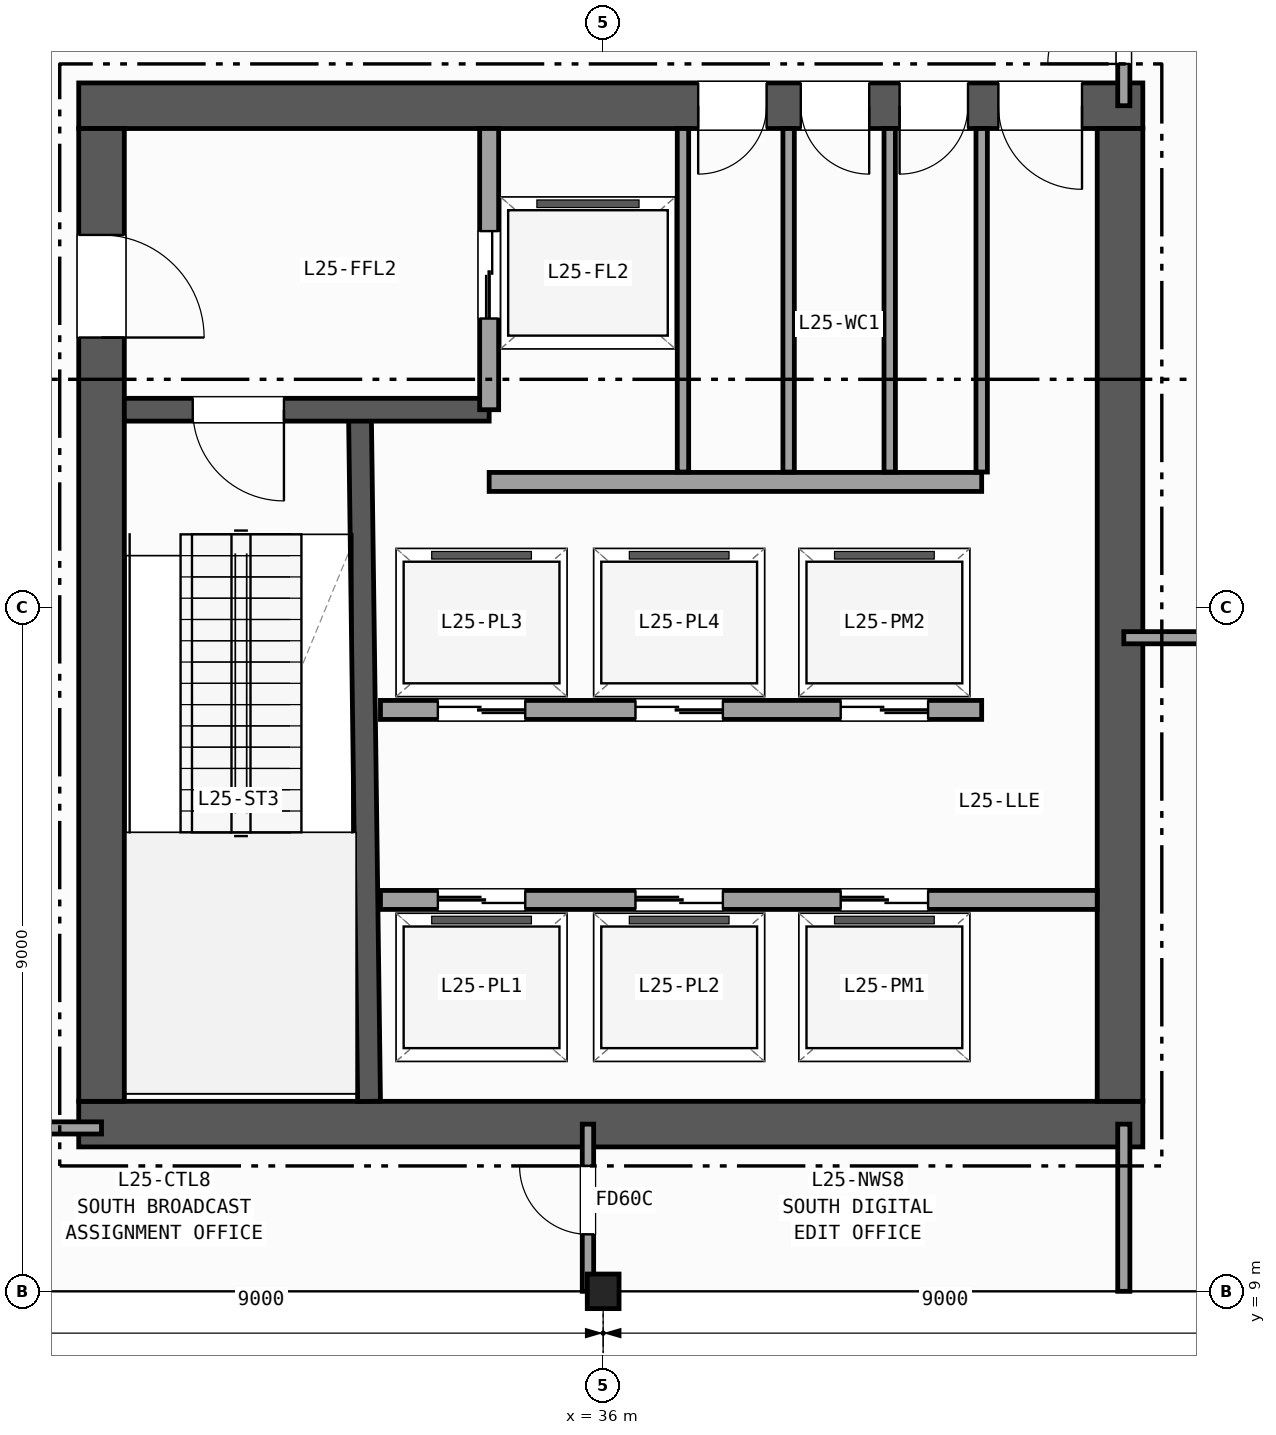
"""IFC4 building model, lengths in metres.
Left out: names, types, materials, properties, quantities, classifications, styles, units other than length and angle.
Written with IfcOpenShell. Run it as: python <this file> out.ifc"""

import sys

from ifc_helpers import new_model, si_unit, direction, frame, frame_2d, origin, origin_2d, place, context, subcontext, project, spatial, rectangle, i_section, extrude, element, fill, save


model = new_model("IFC4")
c1 = context("Model", 3, precision=1e-05, world=origin(), true_north=direction((0.0, 1.0)))
c2 = subcontext(c1, "Body", "Model", "MODEL_VIEW")
j1 = project(units=[si_unit("LENGTHUNIT", "METRE"), si_unit("PLANEANGLEUNIT", "RADIAN")], contexts=[c1])
p1 = place(None, origin())
s1 = spatial("IfcSite", under=j1, at=p1, CompositionType="ELEMENT")
p2 = place(p1, origin())
s2 = spatial("IfcBuilding", under=s1, at=p2, CompositionType="ELEMENT")
p3 = place(p2, frame((0.0, 0.0, 105.0)))
s3 = spatial("IfcBuildingStorey", under=s2, at=p3, CompositionType="ELEMENT", Elevation=105.0)
p4 = place(p3, frame((36.0, 9.0, 0.0), z_axis=(0.0, 0.0, 1.0), x_axis=(1.0, 0.0, 0.0)))
e1 = element("IfcColumn", 1, at=p4, inside=s3, PredefinedType="COLUMN", context=c2, shape_type="SweptSolid", body=[
    extrude(i_section(OverallWidth=0.418, OverallDepth=0.455, WebThickness=0.042, FlangeThickness=0.068, FilletRadius=0.015, at=origin_2d()), origin(), (0.0, 0.0, 1.0), 5.0),
])
p5 = place(p3, frame((29.1, 11.2, 0.0), z_axis=(0.0, 0.0, 1.0), x_axis=(1.0, 0.0, 0.0)))
e2 = element("IfcWall", 2, at=p5, inside=s3, PredefinedType="SHEAR", context=c2, shape_type="SweptSolid", body=[
    extrude(rectangle(XDim=14.0, YDim=0.6, at=frame_2d((7.0, 0.0))), origin(), (0.0, 0.0, 1.0), 4.72),
])
p6 = place(p3, frame((43.1, 24.6, 0.0), z_axis=(0.0, 0.0, 1.0), x_axis=(-1.0, 0.0, 0.0)))
e3 = element("IfcWall", 3, at=p6, inside=s3, PredefinedType="SHEAR", context=c2, shape_type="SweptSolid", body=[
    extrude(rectangle(XDim=14.0, YDim=0.6, at=frame_2d((7.0, 0.0))), origin(), (0.0, 0.0, 1.0), 4.72),
])
p7 = place(p6, frame((0.8, 0.0, 0.0)))
e4 = element("IfcOpeningElement", 4, at=p7, cuts=e3, PredefinedType="OPENING", context=c2, shape_type="SweptSolid", body=[
    extrude(rectangle(XDim=1.1, YDim=2.15, at=frame_2d((0.55, 1.075))), frame((0.0, 0.31, 0.0), z_axis=(0.0, -1.0, 0.0), x_axis=(1.0, 0.0, 0.0)), (0.0, 0.0, 1.0), 0.62),
])
p8 = place(p6, frame((2.3, 0.0, 0.0)))
e5 = element("IfcOpeningElement", 5, at=p8, cuts=e3, PredefinedType="OPENING", context=c2, shape_type="SweptSolid", body=[
    extrude(rectangle(XDim=0.9, YDim=2.1, at=frame_2d((0.45, 1.05))), frame((0.0, 0.31, 0.0), z_axis=(0.0, -1.0, 0.0), x_axis=(1.0, 0.0, 0.0)), (0.0, 0.0, 1.0), 0.62),
])
p9 = place(p6, frame((3.6, 0.0, 0.0)))
e6 = element("IfcOpeningElement", 6, at=p9, cuts=e3, PredefinedType="OPENING", context=c2, shape_type="SweptSolid", body=[
    extrude(rectangle(XDim=0.9, YDim=2.1, at=frame_2d((0.45, 1.05))), frame((0.0, 0.31, 0.0), z_axis=(0.0, -1.0, 0.0), x_axis=(1.0, 0.0, 0.0)), (0.0, 0.0, 1.0), 0.62),
])
p10 = place(p6, frame((4.95, 0.0, 0.0)))
e7 = element("IfcOpeningElement", 7, at=p10, cuts=e3, PredefinedType="OPENING", context=c2, shape_type="SweptSolid", body=[
    extrude(rectangle(XDim=0.9, YDim=2.1, at=frame_2d((0.45, 1.05))), frame((0.0, 0.31, 0.0), z_axis=(0.0, -1.0, 0.0), x_axis=(1.0, 0.0, 0.0)), (0.0, 0.0, 1.0), 0.62),
])
p11 = place(p3, frame((29.4, 24.3, 0.0), z_axis=(0.0, 0.0, 1.0), x_axis=(0.0, -1.0, 0.0)))
e8 = element("IfcWall", 8, at=p11, inside=s3, PredefinedType="SHEAR", context=c2, shape_type="SweptSolid", body=[
    extrude(rectangle(XDim=12.8, YDim=0.6, at=frame_2d((6.4, 0.0))), origin(), (0.0, 0.0, 1.0), 4.72),
])
p12 = place(p11, frame((1.4, 0.0, 0.0)))
e9 = element("IfcOpeningElement", 9, at=p12, cuts=e8, PredefinedType="OPENING", context=c2, shape_type="SweptSolid", body=[
    extrude(rectangle(XDim=1.35, YDim=2.15, at=frame_2d((0.675, 1.075))), frame((0.0, 0.31, 0.0), z_axis=(0.0, -1.0, 0.0), x_axis=(1.0, 0.0, 0.0)), (0.0, 0.0, 1.0), 0.62),
])
p13 = place(p3, frame((42.8, 11.5, 0.0), z_axis=(0.0, 0.0, 1.0), x_axis=(0.0, 1.0, 0.0)))
e10 = element("IfcWall", 10, at=p13, inside=s3, PredefinedType="SHEAR", context=c2, shape_type="SweptSolid", body=[
    extrude(rectangle(XDim=12.8, YDim=0.6, at=frame_2d((6.4, 0.0))), origin(), (0.0, 0.0, 1.0), 4.72),
])
p14 = place(p3, frame((32.92, 11.5, 0.0), z_axis=(0.0, 0.0, 1.0), x_axis=(-0.013244407292, 0.999912288991, 0.0)))
e11 = element("IfcWall", 11, at=p14, inside=s3, PredefinedType="SHEAR", context=c2, shape_type="SweptSolid", body=[
    extrude(rectangle(XDim=9.051, YDim=0.3, at=frame_2d((4.525, 0.0))), origin(), (0.0, 0.0, 1.0), 4.72),
])
p15 = place(p3, frame((34.5, 20.6, 0.0), z_axis=(0.0, 0.0, 1.0), x_axis=(-1.0, 0.0, 0.0)))
e12 = element("IfcWall", 12, at=p15, inside=s3, PredefinedType="SHEAR", context=c2, shape_type="SweptSolid", body=[
    extrude(rectangle(XDim=4.8, YDim=0.3, at=frame_2d((2.4, 0.0))), origin(), (0.0, 0.0, 1.0), 4.72),
])
p16 = place(p15, frame((2.7, 0.0, 0.0)))
e13 = element("IfcOpeningElement", 13, at=p16, cuts=e12, PredefinedType="OPENING", context=c2, shape_type="SweptSolid", body=[
    extrude(rectangle(XDim=1.2, YDim=2.15, at=frame_2d((0.6, 1.075))), frame((0.0, 0.16, 0.0), z_axis=(0.0, -1.0, 0.0), x_axis=(1.0, 0.0, 0.0)), (0.0, 0.0, 1.0), 0.32),
])
p17 = place(p3, frame((34.5, 20.6, 0.0), z_axis=(0.0, 0.0, 1.0), x_axis=(0.0, 1.0, 0.0)))
e14 = element("IfcWall", 14, at=p17, inside=s3, PredefinedType="PARTITIONING", context=c2, shape_type="SweptSolid", body=[
    extrude(rectangle(XDim=3.7, YDim=0.25, at=frame_2d((1.85, 0.0))), origin(), (0.0, 0.0, 1.0), 4.72),
])
p18 = place(p17, frame((1.2, 0.0, 0.0)))
e15 = element("IfcOpeningElement", 15, at=p18, cuts=e14, PredefinedType="OPENING", context=c2, shape_type="SweptSolid", body=[
    extrude(rectangle(XDim=1.15, YDim=2.15, at=frame_2d((0.575, 1.075))), frame((0.0, 0.135, 0.0), z_axis=(0.0, -1.0, 0.0), x_axis=(1.0, 0.0, 0.0)), (0.0, 0.0, 1.0), 0.27),
])
p19 = place(p3, frame((34.5, 19.65, 0.0), z_axis=(0.0, 0.0, 1.0), x_axis=(1.0, 0.0, 0.0)))
e16 = element("IfcWall", 16, at=p19, inside=s3, PredefinedType="PARTITIONING", context=c2, shape_type="SweptSolid", body=[
    extrude(rectangle(XDim=6.48, YDim=0.25, at=frame_2d((3.24, 0.0))), origin(), (0.0, 0.0, 1.0), 4.72),
])
p20 = place(p3, frame((33.07, 14.15, 0.0), z_axis=(0.0, 0.0, 1.0), x_axis=(1.0, 0.0, 0.0)))
e17 = element("IfcWall", 17, at=p20, inside=s3, PredefinedType="PARTITIONING", context=c2, shape_type="SweptSolid", body=[
    extrude(rectangle(XDim=9.43, YDim=0.25, at=frame_2d((4.715, 0.0))), origin(), (0.0, 0.0, 1.0), 4.72),
])
p21 = place(p20, frame((0.755, 0.0, 0.0)))
e18 = element("IfcOpeningElement", 18, at=p21, cuts=e17, PredefinedType="OPENING", context=c2, shape_type="SweptSolid", body=[
    extrude(rectangle(XDim=1.15, YDim=2.15, at=frame_2d((0.575, 1.075))), frame((0.0, 0.135, 0.0), z_axis=(0.0, -1.0, 0.0), x_axis=(1.0, 0.0, 0.0)), (0.0, 0.0, 1.0), 0.27),
])
p22 = place(p20, frame((3.355, 0.0, 0.0)))
e19 = element("IfcOpeningElement", 19, at=p22, cuts=e17, PredefinedType="OPENING", context=c2, shape_type="SweptSolid", body=[
    extrude(rectangle(XDim=1.15, YDim=2.15, at=frame_2d((0.575, 1.075))), frame((0.0, 0.135, 0.0), z_axis=(0.0, -1.0, 0.0), x_axis=(1.0, 0.0, 0.0)), (0.0, 0.0, 1.0), 0.27),
])
p23 = place(p20, frame((6.055, 0.0, 0.0)))
e20 = element("IfcOpeningElement", 20, at=p23, cuts=e17, PredefinedType="OPENING", context=c2, shape_type="SweptSolid", body=[
    extrude(rectangle(XDim=1.15, YDim=2.15, at=frame_2d((0.575, 1.075))), frame((0.0, 0.135, 0.0), z_axis=(0.0, -1.0, 0.0), x_axis=(1.0, 0.0, 0.0)), (0.0, 0.0, 1.0), 0.27),
])
p24 = place(p3, frame((40.98, 16.65, 0.0), z_axis=(0.0, 0.0, 1.0), x_axis=(-1.0, 0.0, 0.0)))
e21 = element("IfcWall", 21, at=p24, inside=s3, PredefinedType="PARTITIONING", context=c2, shape_type="SweptSolid", body=[
    extrude(rectangle(XDim=7.91, YDim=0.25, at=frame_2d((3.955, 0.0))), origin(), (0.0, 0.0, 1.0), 4.72),
])
p25 = place(p24, frame((6.005, 0.0, 0.0)))
e22 = element("IfcOpeningElement", 22, at=p25, cuts=e21, PredefinedType="OPENING", context=c2, shape_type="SweptSolid", body=[
    extrude(rectangle(XDim=1.15, YDim=2.15, at=frame_2d((0.575, 1.075))), frame((0.0, 0.135, 0.0), z_axis=(0.0, -1.0, 0.0), x_axis=(1.0, 0.0, 0.0)), (0.0, 0.0, 1.0), 0.27),
])
p26 = place(p24, frame((3.405, 0.0, 0.0)))
e23 = element("IfcOpeningElement", 23, at=p26, cuts=e21, PredefinedType="OPENING", context=c2, shape_type="SweptSolid", body=[
    extrude(rectangle(XDim=1.15, YDim=2.15, at=frame_2d((0.575, 1.075))), frame((0.0, 0.135, 0.0), z_axis=(0.0, -1.0, 0.0), x_axis=(1.0, 0.0, 0.0)), (0.0, 0.0, 1.0), 0.27),
])
p27 = place(p24, frame((0.705, 0.0, 0.0)))
e24 = element("IfcOpeningElement", 24, at=p27, cuts=e21, PredefinedType="OPENING", context=c2, shape_type="SweptSolid", body=[
    extrude(rectangle(XDim=1.15, YDim=2.15, at=frame_2d((0.575, 1.075))), frame((0.0, 0.135, 0.0), z_axis=(0.0, -1.0, 0.0), x_axis=(1.0, 0.0, 0.0)), (0.0, 0.0, 1.0), 0.27),
])
for number, where, z_axis, x_axis in (
    (25, (37.05, 19.78, 0.0), (0.0, 0.0, 1.0), (0.0, 1.0, 0.0)),
    (26, (38.44, 19.78, 0.0), (0.0, 0.0, 1.0), (0.0, 1.0, 0.0)),
    (27, (39.77, 19.78, 0.0), (0.0, 0.0, 1.0), (0.0, 1.0, 0.0)),
    (28, (40.98, 19.78, 0.0), (0.0, 0.0, 1.0), (0.0, 1.0, 0.0)),
):
    element("IfcWall", number, at=place(p3, frame(where, z_axis=z_axis, x_axis=x_axis)), inside=s3, PredefinedType="PARTITIONING", context=c2, shape_type="SweptSolid", body=[
        extrude(rectangle(XDim=4.52, YDim=0.15, at=frame_2d((2.26, 0.0))), origin(), (0.0, 0.0, 1.0), 4.72),
    ])
p28 = place(p3, frame((24.65, 11.15, 0.0), z_axis=(0.0, 0.0, 1.0), x_axis=(1.0, 0.0, 0.0)))
e29 = element("IfcWall", 29, at=p28, inside=s3, PredefinedType="PARTITIONING", context=c2, shape_type="SweptSolid", body=[
    extrude(rectangle(XDim=4.75, YDim=0.16, at=frame_2d((2.375, 0.0))), origin(), (0.0, 0.0, 1.0), 4.092),
])
p29 = place(p28, frame((1.2, 0.0, 0.0)))
e30 = element("IfcOpeningElement", 30, at=p29, cuts=e29, PredefinedType="OPENING", context=c2, shape_type="SweptSolid", body=[
    extrude(rectangle(XDim=0.86, YDim=2.05, at=frame_2d((0.43, 1.025))), frame((0.0, 0.09, 0.0), z_axis=(0.0, -1.0, 0.0), x_axis=(1.0, 0.0, 0.0)), (0.0, 0.0, 1.0), 0.18),
])
p30 = place(p3, frame((35.8, 9.0, 0.0), z_axis=(0.0, 0.0, 1.0), x_axis=(0.0, 1.0, 0.0)))
e31 = element("IfcWall", 31, at=p30, inside=s3, PredefinedType="PARTITIONING", context=c2, shape_type="SweptSolid", body=[
    extrude(rectangle(XDim=2.2, YDim=0.15, at=frame_2d((1.1, 0.0))), origin(), (0.0, 0.0, 1.0), 3.934),
])
p31 = place(p30, frame((0.75, 0.0, 0.0)))
e32 = element("IfcOpeningElement", 32, at=p31, cuts=e31, PredefinedType="OPENING", context=c2, shape_type="SweptSolid", body=[
    extrude(rectangle(XDim=0.9, YDim=2.1, at=frame_2d((0.45, 1.05))), frame((0.0, 0.085, 0.0), z_axis=(0.0, -1.0, 0.0), x_axis=(1.0, 0.0, 0.0)), (0.0, 0.0, 1.0), 0.17),
])
p32 = place(p3, frame((42.85, 9.0, 0.0), z_axis=(0.0, 0.0, 1.0), x_axis=(0.0, 1.0, 0.0)))
e33 = element("IfcWall", 33, at=p32, inside=s3, PredefinedType="PARTITIONING", context=c2, shape_type="SweptSolid", body=[
    extrude(rectangle(XDim=2.2, YDim=0.16, at=frame_2d((1.1, 0.0))), origin(), (0.0, 0.0, 1.0), 3.934),
])
p33 = place(p3, frame((42.85, 24.6, 0.0), z_axis=(0.0, 0.0, 1.0), x_axis=(0.0, 1.0, 0.0)))
e34 = element("IfcWall", 34, at=p33, inside=s3, PredefinedType="PARTITIONING", context=c2, shape_type="SweptSolid", body=[
    extrude(rectangle(XDim=2.4, YDim=0.16, at=frame_2d((1.2, 0.0))), origin(), (0.0, 0.0, 1.0), 3.934),
])
p34 = place(p33, frame((0.55, 0.0, 0.0)))
e35 = element("IfcOpeningElement", 35, at=p34, cuts=e34, PredefinedType="OPENING", context=c2, shape_type="SweptSolid", body=[
    extrude(rectangle(XDim=1.0, YDim=2.1, at=frame_2d((0.5, 1.05))), frame((0.0, 0.09, 0.0), z_axis=(0.0, -1.0, 0.0), x_axis=(1.0, 0.0, 0.0)), (0.0, 0.0, 1.0), 0.18),
])
p35 = place(p3, frame((42.85, 17.6, 0.0), z_axis=(0.0, 0.0, 1.0), x_axis=(1.0, 0.0, 0.0)))
e36 = element("IfcWall", 36, at=p35, inside=s3, PredefinedType="PARTITIONING", context=c2, shape_type="SweptSolid", body=[
    extrude(rectangle(XDim=11.15, YDim=0.16, at=frame_2d((5.575, 0.0))), origin(), (0.0, 0.0, 1.0), 4.092),
])
p36 = place(p35, frame((2.95, 0.0, 0.0)))
e37 = element("IfcOpeningElement", 37, at=p36, cuts=e36, PredefinedType="OPENING", context=c2, shape_type="SweptSolid", body=[
    extrude(rectangle(XDim=1.05, YDim=2.15, at=frame_2d((0.525, 1.075))), frame((0.0, 0.09, 0.0), z_axis=(0.0, -1.0, 0.0), x_axis=(1.0, 0.0, 0.0)), (0.0, 0.0, 1.0), 0.18),
])
p37 = place(p16, origin())
e38 = element("IfcDoor", 38, at=p37, inside=s3, OperationType="SINGLE_SWING_LEFT", PredefinedType="DOOR", context=c2, shape_type="SweptSolid", body=[
    extrude(rectangle(XDim=1.2, YDim=2.15, at=frame_2d((0.6, 1.075))), frame((0.0, 0.025, 0.0), z_axis=(0.0, -1.0, 0.0), x_axis=(1.0, 0.0, 0.0)), (0.0, 0.0, 1.0), 0.05),
])
fill(e13, e38)
p38 = place(p12, origin())
e39 = element("IfcDoor", 39, at=p38, inside=s3, OperationType="SINGLE_SWING_RIGHT", PredefinedType="DOOR", context=c2, shape_type="SweptSolid", body=[
    extrude(rectangle(XDim=1.35, YDim=2.15, at=frame_2d((0.675, 1.075))), frame((0.0, 0.025, 0.0), z_axis=(0.0, -1.0, 0.0), x_axis=(1.0, 0.0, 0.0)), (0.0, 0.0, 1.0), 0.05),
])
fill(e9, e39)
p39 = place(p7, origin())
e40 = element("IfcDoor", 40, at=p39, inside=s3, OperationType="SINGLE_SWING_LEFT", PredefinedType="DOOR", context=c2, shape_type="SweptSolid", body=[
    extrude(rectangle(XDim=1.1, YDim=2.15, at=frame_2d((0.55, 1.075))), frame((0.0, 0.025, 0.0), z_axis=(0.0, -1.0, 0.0), x_axis=(1.0, 0.0, 0.0)), (0.0, 0.0, 1.0), 0.05),
])
fill(e4, e40)
p40 = place(p8, origin())
e41 = element("IfcDoor", 41, at=p40, inside=s3, OperationType="SINGLE_SWING_RIGHT", PredefinedType="DOOR", context=c2, shape_type="SweptSolid", body=[
    extrude(rectangle(XDim=0.9, YDim=2.1, at=frame_2d((0.45, 1.05))), frame((0.0, 0.025, 0.0), z_axis=(0.0, -1.0, 0.0), x_axis=(1.0, 0.0, 0.0)), (0.0, 0.0, 1.0), 0.05),
])
fill(e5, e41)
p41 = place(p9, origin())
e42 = element("IfcDoor", 42, at=p41, inside=s3, OperationType="SINGLE_SWING_LEFT", PredefinedType="DOOR", context=c2, shape_type="SweptSolid", body=[
    extrude(rectangle(XDim=0.9, YDim=2.1, at=frame_2d((0.45, 1.05))), frame((0.0, 0.025, 0.0), z_axis=(0.0, -1.0, 0.0), x_axis=(1.0, 0.0, 0.0)), (0.0, 0.0, 1.0), 0.05),
])
fill(e6, e42)
p42 = place(p10, origin())
e43 = element("IfcDoor", 43, at=p42, inside=s3, OperationType="SINGLE_SWING_RIGHT", PredefinedType="DOOR", context=c2, shape_type="SweptSolid", body=[
    extrude(rectangle(XDim=0.9, YDim=2.1, at=frame_2d((0.45, 1.05))), frame((0.0, 0.025, 0.0), z_axis=(0.0, -1.0, 0.0), x_axis=(1.0, 0.0, 0.0)), (0.0, 0.0, 1.0), 0.05),
])
fill(e7, e43)
p43 = place(p18, origin())
e44 = element("IfcDoor", 44, at=p43, inside=s3, OperationType="DOUBLE_DOOR_SLIDING", PredefinedType="DOOR", context=c2, shape_type="SweptSolid", body=[
    extrude(rectangle(XDim=1.15, YDim=2.15, at=frame_2d((0.575, 1.075))), frame((0.0, 0.025, 0.0), z_axis=(0.0, -1.0, 0.0), x_axis=(1.0, 0.0, 0.0)), (0.0, 0.0, 1.0), 0.05),
])
fill(e15, e44)
p44 = place(p21, origin())
e45 = element("IfcDoor", 45, at=p44, inside=s3, OperationType="DOUBLE_DOOR_SLIDING", PredefinedType="DOOR", context=c2, shape_type="SweptSolid", body=[
    extrude(rectangle(XDim=1.15, YDim=2.15, at=frame_2d((0.575, 1.075))), frame((0.0, 0.025, 0.0), z_axis=(0.0, -1.0, 0.0), x_axis=(1.0, 0.0, 0.0)), (0.0, 0.0, 1.0), 0.05),
])
fill(e18, e45)
p45 = place(p22, origin())
e46 = element("IfcDoor", 46, at=p45, inside=s3, OperationType="DOUBLE_DOOR_SLIDING", PredefinedType="DOOR", context=c2, shape_type="SweptSolid", body=[
    extrude(rectangle(XDim=1.15, YDim=2.15, at=frame_2d((0.575, 1.075))), frame((0.0, 0.025, 0.0), z_axis=(0.0, -1.0, 0.0), x_axis=(1.0, 0.0, 0.0)), (0.0, 0.0, 1.0), 0.05),
])
fill(e19, e46)
p46 = place(p25, origin())
e47 = element("IfcDoor", 47, at=p46, inside=s3, OperationType="DOUBLE_DOOR_SLIDING", PredefinedType="DOOR", context=c2, shape_type="SweptSolid", body=[
    extrude(rectangle(XDim=1.15, YDim=2.15, at=frame_2d((0.575, 1.075))), frame((0.0, 0.025, 0.0), z_axis=(0.0, -1.0, 0.0), x_axis=(1.0, 0.0, 0.0)), (0.0, 0.0, 1.0), 0.05),
])
fill(e22, e47)
p47 = place(p26, origin())
e48 = element("IfcDoor", 48, at=p47, inside=s3, OperationType="DOUBLE_DOOR_SLIDING", PredefinedType="DOOR", context=c2, shape_type="SweptSolid", body=[
    extrude(rectangle(XDim=1.15, YDim=2.15, at=frame_2d((0.575, 1.075))), frame((0.0, 0.025, 0.0), z_axis=(0.0, -1.0, 0.0), x_axis=(1.0, 0.0, 0.0)), (0.0, 0.0, 1.0), 0.05),
])
fill(e23, e48)
p48 = place(p23, origin())
e49 = element("IfcDoor", 49, at=p48, inside=s3, OperationType="DOUBLE_DOOR_SLIDING", PredefinedType="DOOR", context=c2, shape_type="SweptSolid", body=[
    extrude(rectangle(XDim=1.15, YDim=2.15, at=frame_2d((0.575, 1.075))), frame((0.0, 0.025, 0.0), z_axis=(0.0, -1.0, 0.0), x_axis=(1.0, 0.0, 0.0)), (0.0, 0.0, 1.0), 0.05),
])
fill(e20, e49)
p49 = place(p27, origin())
e50 = element("IfcDoor", 50, at=p49, inside=s3, OperationType="DOUBLE_DOOR_SLIDING", PredefinedType="DOOR", context=c2, shape_type="SweptSolid", body=[
    extrude(rectangle(XDim=1.15, YDim=2.15, at=frame_2d((0.575, 1.075))), frame((0.0, 0.025, 0.0), z_axis=(0.0, -1.0, 0.0), x_axis=(1.0, 0.0, 0.0)), (0.0, 0.0, 1.0), 0.05),
])
fill(e24, e50)
p50 = place(p31, origin())
e51 = element("IfcDoor", 51, at=p50, inside=s3, OperationType="SINGLE_SWING_RIGHT", PredefinedType="DOOR", context=c2, shape_type="SweptSolid", body=[
    extrude(rectangle(XDim=0.9, YDim=2.1, at=frame_2d((0.45, 1.05))), frame((0.0, 0.025, 0.0), z_axis=(0.0, -1.0, 0.0), x_axis=(1.0, 0.0, 0.0)), (0.0, 0.0, 1.0), 0.05),
])
fill(e32, e51)
p51 = place(p34, origin())
e52 = element("IfcDoor", 52, at=p51, inside=s3, OperationType="SINGLE_SWING_LEFT", PredefinedType="DOOR", context=c2, shape_type="SweptSolid", body=[
    extrude(rectangle(XDim=1.0, YDim=2.1, at=frame_2d((0.5, 1.05))), frame((0.0, 0.025, 0.0), z_axis=(0.0, -1.0, 0.0), x_axis=(1.0, 0.0, 0.0)), (0.0, 0.0, 1.0), 0.05),
])
fill(e35, e52)
save(model, sys.argv[1])
